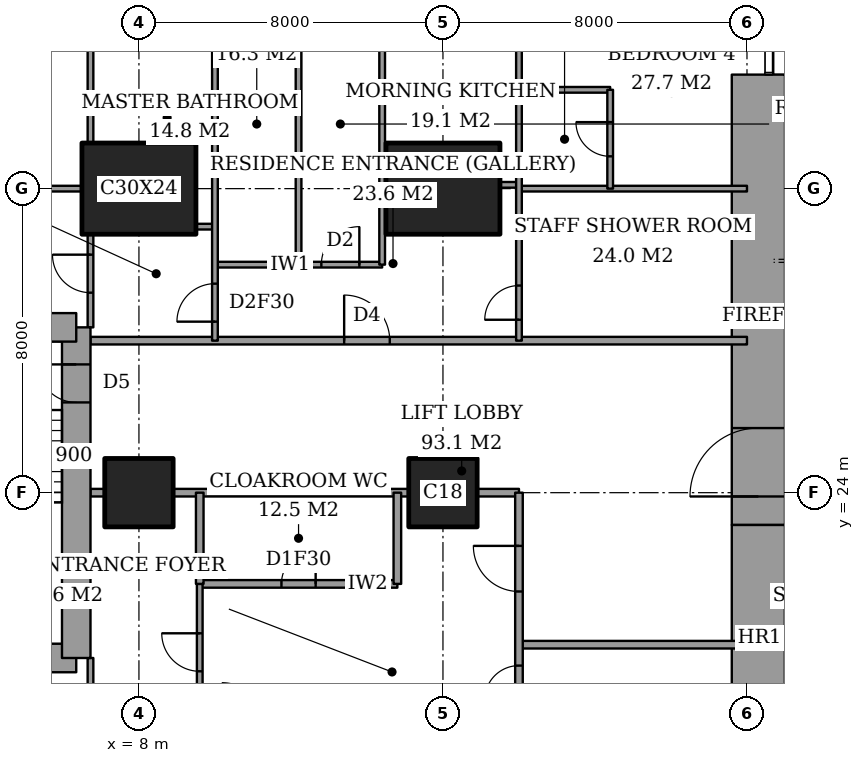
"""IFC4 building model, lengths in metres.
Left out: names, types, materials, properties, quantities, classifications, styles, units other than length and angle.
Written with IfcOpenShell. Run it as: python <this file> out.ifc"""

import sys

from ifc_helpers import new_model, si_unit, direction, frame, frame_2d, origin, origin_2d, place, context, subcontext, project, spatial, rectangle, extrude, element, fill, save


model = new_model("IFC4")
c1 = context("Model", 3, precision=1e-05, world=origin(), true_north=direction((0.0, 1.0)))
c2 = subcontext(c1, "Body", "Model", "MODEL_VIEW")
j1 = project(units=[si_unit("LENGTHUNIT", "METRE"), si_unit("PLANEANGLEUNIT", "RADIAN")], contexts=[c1])
p1 = place(None, origin())
s1 = spatial("IfcSite", under=j1, at=p1, CompositionType="ELEMENT")
p2 = place(p1, origin())
s2 = spatial("IfcBuilding", under=s1, at=p2, CompositionType="ELEMENT")
p3 = place(p2, frame((0.0, 0.0, 185.8)))
s3 = spatial("IfcBuildingStorey", under=s2, at=p3, CompositionType="ELEMENT", Elevation=185.8)
p4 = place(p3, frame((8.0, 24.0, 0.0), z_axis=(0.0, 0.0, 1.0), x_axis=(1.0, 0.0, 0.0)))
e1 = element("IfcColumn", 1, at=p4, inside=s3, PredefinedType="COLUMN", context=c2, shape_type="SweptSolid", body=[
    extrude(rectangle(XDim=1.8, YDim=1.8, at=origin_2d()), origin(), (0.0, 0.0, 1.0), 3.6),
])
p5 = place(p3, frame((8.0, 32.0, 0.0), z_axis=(0.0, 0.0, 1.0), x_axis=(1.0, 0.0, 0.0)))
e2 = element("IfcColumn", 2, at=p5, inside=s3, PredefinedType="COLUMN", context=c2, shape_type="SweptSolid", body=[
    extrude(rectangle(XDim=3.0, YDim=2.4, at=origin_2d()), origin(), (0.0, 0.0, 1.0), 3.6),
])
p6 = place(p3, frame((16.0, 24.0, 0.0), z_axis=(0.0, 0.0, 1.0), x_axis=(1.0, 0.0, 0.0)))
e3 = element("IfcColumn", 3, at=p6, inside=s3, PredefinedType="COLUMN", context=c2, shape_type="SweptSolid", body=[
    extrude(rectangle(XDim=1.8, YDim=1.8, at=origin_2d()), origin(), (0.0, 0.0, 1.0), 3.6),
])
p7 = place(p3, frame((16.0, 32.0, 0.0), z_axis=(0.0, 0.0, 1.0), x_axis=(1.0, 0.0, 0.0)))
e4 = element("IfcColumn", 4, at=p7, inside=s3, PredefinedType="COLUMN", context=c2, shape_type="SweptSolid", body=[
    extrude(rectangle(XDim=3.0, YDim=2.4, at=origin_2d()), origin(), (0.0, 0.0, 1.0), 3.6),
])
p8 = place(p3, frame((24.3, 13.0, 0.0), z_axis=(0.0, 0.0, 1.0), x_axis=(0.0, 1.0, 0.0)))
e5 = element("IfcWall", 5, at=p8, inside=s3, PredefinedType="SHEAR", context=c2, shape_type="SweptSolid", body=[
    extrude(rectangle(XDim=10.15, YDim=1.4, at=frame_2d((5.075, 0.0))), origin(), (0.0, 0.0, 1.0), 3.6),
])
p9 = place(p3, frame((24.3, 23.15, 0.0), z_axis=(0.0, 0.0, 1.0), x_axis=(0.0, 1.0, 0.0)))
e6 = element("IfcWall", 6, at=p9, inside=s3, PredefinedType="SHEAR", context=c2, shape_type="SweptSolid", body=[
    extrude(rectangle(XDim=11.85, YDim=1.4, at=frame_2d((5.925, 0.0))), origin(), (0.0, 0.0, 1.0), 3.6),
])
p10 = place(p9, frame((0.75, 0.0, 0.0)))
e7 = element("IfcOpeningElement", 7, at=p10, cuts=e6, PredefinedType="OPENING", context=c2, shape_type="SweptSolid", body=[
    extrude(rectangle(XDim=1.8, YDim=2.4, at=frame_2d((0.9, 1.2))), frame((0.0, 0.71, 0.0), z_axis=(0.0, -1.0, 0.0), x_axis=(1.0, 0.0, 0.0)), (0.0, 0.0, 1.0), 1.42),
])
p11 = place(p3, frame((1.9, 19.65, 0.0), z_axis=(0.0, 0.0, 1.0), x_axis=(1.0, 0.0, 0.0)))
e8 = element("IfcWall", 8, at=p11, inside=s3, PredefinedType="SHEAR", context=c2, shape_type="SweptSolid", body=[
    extrude(rectangle(XDim=4.45, YDim=0.75, at=frame_2d((2.225, 0.0))), origin(), (0.0, 0.0, 1.0), 3.6),
])
p12 = place(p3, frame((6.35, 19.65, 0.0), z_axis=(0.0, 0.0, 1.0), x_axis=(0.0, 1.0, 0.0)))
e9 = element("IfcWall", 9, at=p12, inside=s3, PredefinedType="SHEAR", context=c2, shape_type="SweptSolid", body=[
    extrude(rectangle(XDim=8.7, YDim=0.75, at=frame_2d((4.35, 0.0))), origin(), (0.0, 0.0, 1.0), 3.6),
])
p13 = place(p12, frame((6.725, 0.0, 0.0)))
e10 = element("IfcOpeningElement", 10, at=p13, cuts=e9, PredefinedType="OPENING", context=c2, shape_type="SweptSolid", body=[
    extrude(rectangle(XDim=1.0, YDim=2.1, at=frame_2d((0.5, 1.05))), frame((0.0, 0.385, 0.0), z_axis=(0.0, -1.0, 0.0), x_axis=(1.0, 0.0, 0.0)), (0.0, 0.0, 1.0), 0.77),
])
p14 = place(p3, frame((6.35, 28.35, 0.0), z_axis=(0.0, 0.0, 1.0), x_axis=(-1.0, 0.0, 0.0)))
e11 = element("IfcWall", 11, at=p14, inside=s3, PredefinedType="SHEAR", context=c2, shape_type="SweptSolid", body=[
    extrude(rectangle(XDim=4.45, YDim=0.75, at=frame_2d((2.225, 0.0))), origin(), (0.0, 0.0, 1.0), 3.6),
])
p15 = place(p3, frame((18.0, 20.0, 0.0), z_axis=(0.0, 0.0, 1.0), x_axis=(1.0, 0.0, 0.0)))
e12 = element("IfcWall", 12, at=p15, inside=s3, PredefinedType="PARTITIONING", context=c2, shape_type="SweptSolid", body=[
    extrude(rectangle(XDim=6.0, YDim=0.2, at=frame_2d((3.0, 0.0))), origin(), (0.0, 0.0, 1.0), 3.35),
])
p16 = place(p3, frame((9.6, 21.6, 0.0), z_axis=(0.0, 0.0, 1.0), x_axis=(1.0, 0.0, 0.0)))
e13 = element("IfcWall", 13, at=p16, inside=s3, PredefinedType="PARTITIONING", context=c2, shape_type="SweptSolid", body=[
    extrude(rectangle(XDim=5.2, YDim=0.2, at=frame_2d((2.6, 0.0))), origin(), (0.0, 0.0, 1.0), 3.35),
])
p17 = place(p16, frame((2.15, 0.0, 0.0)))
e14 = element("IfcOpeningElement", 14, at=p17, cuts=e13, PredefinedType="OPENING", context=c2, shape_type="SweptSolid", body=[
    extrude(rectangle(XDim=0.9, YDim=2.1, at=frame_2d((0.45, 1.05))), frame((0.0, 0.11, 0.0), z_axis=(0.0, -1.0, 0.0), x_axis=(1.0, 0.0, 0.0)), (0.0, 0.0, 1.0), 0.22),
])
p18 = place(p3, frame((6.725, 24.0, 0.0), z_axis=(0.0, 0.0, 1.0), x_axis=(1.0, 0.0, 0.0)))
e15 = element("IfcWall", 15, at=p18, inside=s3, PredefinedType="PARTITIONING", context=c2, shape_type="SweptSolid", body=[
    extrude(rectangle(XDim=0.375, YDim=0.2, at=frame_2d((0.188, 0.0))), origin(), (0.0, 0.0, 1.0), 3.35),
])
p19 = place(p3, frame((8.9, 24.0, 0.0), z_axis=(0.0, 0.0, 1.0), x_axis=(1.0, 0.0, 0.0)))
e16 = element("IfcWall", 16, at=p19, inside=s3, PredefinedType="PARTITIONING", context=c2, shape_type="SweptSolid", body=[
    extrude(rectangle(XDim=6.2, YDim=0.2, at=frame_2d((3.1, 0.0))), origin(), (0.0, 0.0, 1.0), 3.35),
])
p20 = place(p3, frame((16.9, 24.0, 0.0), z_axis=(0.0, 0.0, 1.0), x_axis=(1.0, 0.0, 0.0)))
e17 = element("IfcWall", 17, at=p20, inside=s3, PredefinedType="PARTITIONING", context=c2, shape_type="SweptSolid", body=[
    extrude(rectangle(XDim=1.1, YDim=0.2, at=frame_2d((0.55, 0.0))), origin(), (0.0, 0.0, 1.0), 3.35),
])
p21 = place(p3, frame((6.725, 28.0, 0.0), z_axis=(0.0, 0.0, 1.0), x_axis=(1.0, 0.0, 0.0)))
e18 = element("IfcWall", 18, at=p21, inside=s3, PredefinedType="PARTITIONING", context=c2, shape_type="SweptSolid", body=[
    extrude(rectangle(XDim=17.275, YDim=0.2, at=frame_2d((8.637, 0.0))), origin(), (0.0, 0.0, 1.0), 3.35),
])
p22 = place(p21, frame((6.675, 0.0, 0.0)))
e19 = element("IfcOpeningElement", 19, at=p22, cuts=e18, PredefinedType="OPENING", context=c2, shape_type="SweptSolid", body=[
    extrude(rectangle(XDim=1.2, YDim=2.4, at=frame_2d((0.6, 1.2))), frame((0.0, 0.11, 0.0), z_axis=(0.0, -1.0, 0.0), x_axis=(1.0, 0.0, 0.0)), (0.0, 0.0, 1.0), 0.22),
])
p23 = place(p3, frame((10.0, 30.0, 0.0), z_axis=(0.0, 0.0, 1.0), x_axis=(1.0, 0.0, 0.0)))
e20 = element("IfcWall", 20, at=p23, inside=s3, PredefinedType="PARTITIONING", context=c2, shape_type="SweptSolid", body=[
    extrude(rectangle(XDim=4.4, YDim=0.15, at=frame_2d((2.2, 0.0))), origin(), (0.0, 0.0, 1.0), 3.35),
])
p24 = place(p23, frame((2.8, 0.0, 0.0)))
e21 = element("IfcOpeningElement", 21, at=p24, cuts=e20, PredefinedType="OPENING", context=c2, shape_type="SweptSolid", body=[
    extrude(rectangle(XDim=1.0, YDim=2.1, at=frame_2d((0.5, 1.05))), frame((0.0, 0.085, 0.0), z_axis=(0.0, -1.0, 0.0), x_axis=(1.0, 0.0, 0.0)), (0.0, 0.0, 1.0), 0.17),
])
p25 = place(p3, frame((9.5, 31.0, 0.0), z_axis=(0.0, 0.0, 1.0), x_axis=(1.0, 0.0, 0.0)))
e22 = element("IfcWall", 22, at=p25, inside=s3, PredefinedType="PARTITIONING", context=c2, shape_type="SweptSolid", body=[
    extrude(rectangle(XDim=0.5, YDim=0.15, at=frame_2d((0.25, 0.0))), origin(), (0.0, 0.0, 1.0), 3.35),
])
p26 = place(p3, frame((1.25, 32.0, 0.0), z_axis=(0.0, 0.0, 1.0), x_axis=(1.0, 0.0, 0.0)))
e23 = element("IfcWall", 23, at=p26, inside=s3, PredefinedType="PARTITIONING", context=c2, shape_type="SweptSolid", body=[
    extrude(rectangle(XDim=5.25, YDim=0.15, at=frame_2d((2.625, 0.0))), origin(), (0.0, 0.0, 1.0), 2.634),
])
p27 = place(p3, frame((18.0, 32.0, 0.0), z_axis=(0.0, 0.0, 1.0), x_axis=(1.0, 0.0, 0.0)))
e24 = element("IfcWall", 24, at=p27, inside=s3, PredefinedType="PARTITIONING", context=c2, shape_type="SweptSolid", body=[
    extrude(rectangle(XDim=6.0, YDim=0.15, at=frame_2d((3.0, 0.0))), origin(), (0.0, 0.0, 1.0), 2.634),
])
p28 = place(p3, frame((17.5, 32.1, 0.0), z_axis=(0.0, 0.0, 1.0), x_axis=(1.0, 0.0, 0.0)))
e25 = element("IfcWall", 25, at=p28, inside=s3, PredefinedType="PARTITIONING", context=c2, shape_type="SweptSolid", body=[
    extrude(rectangle(XDim=0.5, YDim=0.15, at=frame_2d((0.25, 0.0))), origin(), (0.0, 0.0, 1.0), 2.634),
])
p29 = place(p3, frame((18.0, 34.6, 0.0), z_axis=(0.0, 0.0, 1.0), x_axis=(1.0, 0.0, 0.0)))
e26 = element("IfcWall", 26, at=p29, inside=s3, PredefinedType="PARTITIONING", context=c2, shape_type="SweptSolid", body=[
    extrude(rectangle(XDim=2.4, YDim=0.15, at=frame_2d((1.2, 0.0))), origin(), (0.0, 0.0, 1.0), 3.35),
])
p30 = place(p3, frame((6.725, 17.2, 0.0), z_axis=(0.0, 0.0, 1.0), x_axis=(0.0, 1.0, 0.0)))
e27 = element("IfcWall", 27, at=p30, inside=s3, PredefinedType="PARTITIONING", context=c2, shape_type="SweptSolid", body=[
    extrude(rectangle(XDim=2.45, YDim=0.15, at=frame_2d((1.225, 0.0))), origin(), (0.0, 0.0, 1.0), 3.35),
])
p31 = place(p30, frame((0.587, 0.0, 0.0)))
e28 = element("IfcOpeningElement", 28, at=p31, cuts=e27, PredefinedType="OPENING", context=c2, shape_type="SweptSolid", body=[
    extrude(rectangle(XDim=0.9, YDim=2.1, at=frame_2d((0.45, 1.05))), frame((0.0, 0.085, 0.0), z_axis=(0.0, -1.0, 0.0), x_axis=(1.0, 0.0, 0.0)), (0.0, 0.0, 1.0), 0.17),
])
p32 = place(p3, frame((6.725, 28.35, 0.0), z_axis=(0.0, 0.0, 1.0), x_axis=(0.0, 1.0, 0.0)))
e29 = element("IfcWall", 29, at=p32, inside=s3, PredefinedType="PARTITIONING", context=c2, shape_type="SweptSolid", body=[
    extrude(rectangle(XDim=2.45, YDim=0.15, at=frame_2d((1.225, 0.0))), origin(), (0.0, 0.0, 1.0), 3.35),
])
p33 = place(p32, frame((0.913, 0.0, 0.0)))
e30 = element("IfcOpeningElement", 30, at=p33, cuts=e29, PredefinedType="OPENING", context=c2, shape_type="SweptSolid", body=[
    extrude(rectangle(XDim=1.0, YDim=2.1, at=frame_2d((0.5, 1.05))), frame((0.0, 0.085, 0.0), z_axis=(0.0, -1.0, 0.0), x_axis=(1.0, 0.0, 0.0)), (0.0, 0.0, 1.0), 0.17),
])
p34 = place(p3, frame((6.725, 33.2, 0.0), z_axis=(0.0, 0.0, 1.0), x_axis=(0.0, 1.0, 0.0)))
e31 = element("IfcWall", 31, at=p34, inside=s3, PredefinedType="PARTITIONING", context=c2, shape_type="SweptSolid", body=[
    extrude(rectangle(XDim=4.2, YDim=0.15, at=frame_2d((2.1, 0.0))), origin(), (0.0, 0.0, 1.0), 3.35),
])
p35 = place(p3, frame((9.6, 21.6, 0.0), z_axis=(0.0, 0.0, 1.0), x_axis=(0.0, 1.0, 0.0)))
e32 = element("IfcWall", 32, at=p35, inside=s3, PredefinedType="PARTITIONING", context=c2, shape_type="SweptSolid", body=[
    extrude(rectangle(XDim=2.4, YDim=0.2, at=frame_2d((1.2, 0.0))), origin(), (0.0, 0.0, 1.0), 3.35),
])
p36 = place(p3, frame((9.6, 10.6, 0.0), z_axis=(0.0, 0.0, 1.0), x_axis=(0.0, 1.0, 0.0)))
e33 = element("IfcWall", 33, at=p36, inside=s3, PredefinedType="PARTITIONING", context=c2, shape_type="SweptSolid", body=[
    extrude(rectangle(XDim=11.0, YDim=0.15, at=frame_2d((5.5, 0.0))), origin(), (0.0, 0.0, 1.0), 3.35),
])
p37 = place(p36, frame((8.7, 0.0, 0.0)))
e34 = element("IfcOpeningElement", 34, at=p37, cuts=e33, PredefinedType="OPENING", context=c2, shape_type="SweptSolid", body=[
    extrude(rectangle(XDim=1.0, YDim=2.1, at=frame_2d((0.5, 1.05))), frame((0.0, 0.085, 0.0), z_axis=(0.0, -1.0, 0.0), x_axis=(1.0, 0.0, 0.0)), (0.0, 0.0, 1.0), 0.17),
])
p38 = place(p3, frame((10.0, 28.0, 0.0), z_axis=(0.0, 0.0, 1.0), x_axis=(0.0, 1.0, 0.0)))
e35 = element("IfcWall", 35, at=p38, inside=s3, PredefinedType="PARTITIONING", context=c2, shape_type="SweptSolid", body=[
    extrude(rectangle(XDim=9.4, YDim=0.15, at=frame_2d((4.7, 0.0))), origin(), (0.0, 0.0, 1.0), 3.35),
])
p39 = place(p38, frame((0.5, 0.0, 0.0)))
e36 = element("IfcOpeningElement", 36, at=p39, cuts=e35, PredefinedType="OPENING", context=c2, shape_type="SweptSolid", body=[
    extrude(rectangle(XDim=1.0, YDim=2.1, at=frame_2d((0.5, 1.05))), frame((0.0, 0.085, 0.0), z_axis=(0.0, -1.0, 0.0), x_axis=(1.0, 0.0, 0.0)), (0.0, 0.0, 1.0), 0.17),
])
for number, where, z_axis, x_axis in (
    (37, (12.2, 30.0, 0.0), (0.0, 0.0, 1.0), (0.0, 1.0, 0.0)),
    (38, (14.4, 30.0, 0.0), (0.0, 0.0, 1.0), (0.0, 1.0, 0.0)),
):
    element("IfcWall", number, at=place(p3, frame(where, z_axis=z_axis, x_axis=x_axis)), inside=s3, PredefinedType="PARTITIONING", context=c2, shape_type="SweptSolid", body=[
        extrude(rectangle(XDim=7.4, YDim=0.15, at=frame_2d((3.7, 0.0))), origin(), (0.0, 0.0, 1.0), 3.35),
    ])
p40 = place(p3, frame((14.8, 21.6, 0.0), z_axis=(0.0, 0.0, 1.0), x_axis=(0.0, 1.0, 0.0)))
e39 = element("IfcWall", 39, at=p40, inside=s3, PredefinedType="PARTITIONING", context=c2, shape_type="SweptSolid", body=[
    extrude(rectangle(XDim=2.4, YDim=0.2, at=frame_2d((1.2, 0.0))), origin(), (0.0, 0.0, 1.0), 3.35),
])
p41 = place(p3, frame((18.0, 18.0, 0.0), z_axis=(0.0, 0.0, 1.0), x_axis=(0.0, 1.0, 0.0)))
e40 = element("IfcWall", 40, at=p41, inside=s3, PredefinedType="PARTITIONING", context=c2, shape_type="SweptSolid", body=[
    extrude(rectangle(XDim=6.0, YDim=0.2, at=frame_2d((3.0, 0.0))), origin(), (0.0, 0.0, 1.0), 3.35),
])
p42 = place(p41, frame((3.4, 0.0, 0.0)))
e41 = element("IfcOpeningElement", 41, at=p42, cuts=e40, PredefinedType="OPENING", context=c2, shape_type="SweptSolid", body=[
    extrude(rectangle(XDim=1.2, YDim=2.4, at=frame_2d((0.6, 1.2))), frame((0.0, 0.11, 0.0), z_axis=(0.0, -1.0, 0.0), x_axis=(1.0, 0.0, 0.0)), (0.0, 0.0, 1.0), 0.22),
])
p43 = place(p41, frame((0.55, 0.0, 0.0)))
e42 = element("IfcOpeningElement", 42, at=p43, cuts=e40, PredefinedType="OPENING", context=c2, shape_type="SweptSolid", body=[
    extrude(rectangle(XDim=0.9, YDim=2.1, at=frame_2d((0.45, 1.05))), frame((0.0, 0.11, 0.0), z_axis=(0.0, -1.0, 0.0), x_axis=(1.0, 0.0, 0.0)), (0.0, 0.0, 1.0), 0.22),
])
p44 = place(p3, frame((18.0, 28.0, 0.0), z_axis=(0.0, 0.0, 1.0), x_axis=(0.0, 1.0, 0.0)))
e43 = element("IfcWall", 43, at=p44, inside=s3, PredefinedType="PARTITIONING", context=c2, shape_type="SweptSolid", body=[
    extrude(rectangle(XDim=9.4, YDim=0.15, at=frame_2d((4.7, 0.0))), origin(), (0.0, 0.0, 1.0), 3.35),
])
p45 = place(p44, frame((0.55, 0.0, 0.0)))
e44 = element("IfcOpeningElement", 44, at=p45, cuts=e43, PredefinedType="OPENING", context=c2, shape_type="SweptSolid", body=[
    extrude(rectangle(XDim=0.9, YDim=2.1, at=frame_2d((0.45, 1.05))), frame((0.0, 0.085, 0.0), z_axis=(0.0, -1.0, 0.0), x_axis=(1.0, 0.0, 0.0)), (0.0, 0.0, 1.0), 0.17),
])
p46 = place(p3, frame((20.4, 32.0, 0.0), z_axis=(0.0, 0.0, 1.0), x_axis=(0.0, 1.0, 0.0)))
e45 = element("IfcWall", 45, at=p46, inside=s3, PredefinedType="PARTITIONING", context=c2, shape_type="SweptSolid", body=[
    extrude(rectangle(XDim=2.6, YDim=0.15, at=frame_2d((1.3, 0.0))), origin(), (0.0, 0.0, 1.0), 3.35),
])
p47 = place(p46, frame((0.85, 0.0, 0.0)))
e46 = element("IfcOpeningElement", 46, at=p47, cuts=e45, PredefinedType="OPENING", context=c2, shape_type="SweptSolid", body=[
    extrude(rectangle(XDim=0.9, YDim=2.1, at=frame_2d((0.45, 1.05))), frame((0.0, 0.085, 0.0), z_axis=(0.0, -1.0, 0.0), x_axis=(1.0, 0.0, 0.0)), (0.0, 0.0, 1.0), 0.17),
])
p48 = place(p37, origin())
e47 = element("IfcDoor", 47, at=p48, inside=s3, OperationType="SINGLE_SWING_LEFT", PredefinedType="DOOR", context=c2, shape_type="SweptSolid", body=[
    extrude(rectangle(XDim=1.0, YDim=2.1, at=frame_2d((0.5, 1.05))), frame((0.0, 0.025, 0.0), z_axis=(0.0, -1.0, 0.0), x_axis=(1.0, 0.0, 0.0)), (0.0, 0.0, 1.0), 0.05),
])
fill(e34, e47)
p49 = place(p17, origin())
e48 = element("IfcDoor", 48, at=p49, inside=s3, OperationType="SINGLE_SWING_LEFT", PredefinedType="DOOR", context=c2, shape_type="SweptSolid", body=[
    extrude(rectangle(XDim=0.9, YDim=2.1, at=frame_2d((0.45, 1.05))), frame((0.0, 0.025, 0.0), z_axis=(0.0, -1.0, 0.0), x_axis=(1.0, 0.0, 0.0)), (0.0, 0.0, 1.0), 0.05),
])
fill(e14, e48)
p50 = place(p42, origin())
e49 = element("IfcDoor", 49, at=p50, inside=s3, OperationType="SINGLE_SWING_LEFT", PredefinedType="DOOR", context=c2, shape_type="SweptSolid", body=[
    extrude(rectangle(XDim=1.2, YDim=2.4, at=frame_2d((0.6, 1.2))), frame((0.0, 0.025, 0.0), z_axis=(0.0, -1.0, 0.0), x_axis=(1.0, 0.0, 0.0)), (0.0, 0.0, 1.0), 0.05),
])
fill(e41, e49)
p51 = place(p43, origin())
e50 = element("IfcDoor", 50, at=p51, inside=s3, OperationType="SINGLE_SWING_RIGHT", PredefinedType="DOOR", context=c2, shape_type="SweptSolid", body=[
    extrude(rectangle(XDim=0.9, YDim=2.1, at=frame_2d((0.45, 1.05))), frame((0.0, 0.025, 0.0), z_axis=(0.0, -1.0, 0.0), x_axis=(1.0, 0.0, 0.0)), (0.0, 0.0, 1.0), 0.05),
])
fill(e42, e50)
p52 = place(p33, origin())
e51 = element("IfcDoor", 51, at=p52, inside=s3, OperationType="SINGLE_SWING_LEFT", PredefinedType="DOOR", context=c2, shape_type="SweptSolid", body=[
    extrude(rectangle(XDim=1.0, YDim=2.1, at=frame_2d((0.5, 1.05))), frame((0.0, 0.025, 0.0), z_axis=(0.0, -1.0, 0.0), x_axis=(1.0, 0.0, 0.0)), (0.0, 0.0, 1.0), 0.05),
])
fill(e30, e51)
p53 = place(p39, origin())
e52 = element("IfcDoor", 52, at=p53, inside=s3, OperationType="SINGLE_SWING_RIGHT", PredefinedType="DOOR", context=c2, shape_type="SweptSolid", body=[
    extrude(rectangle(XDim=1.0, YDim=2.1, at=frame_2d((0.5, 1.05))), frame((0.0, 0.025, 0.0), z_axis=(0.0, -1.0, 0.0), x_axis=(1.0, 0.0, 0.0)), (0.0, 0.0, 1.0), 0.05),
])
fill(e36, e52)
p54 = place(p22, origin())
e53 = element("IfcDoor", 53, at=p54, inside=s3, OperationType="SINGLE_SWING_RIGHT", PredefinedType="DOOR", context=c2, shape_type="SweptSolid", body=[
    extrude(rectangle(XDim=1.2, YDim=2.4, at=frame_2d((0.6, 1.2))), frame((0.0, 0.025, 0.0), z_axis=(0.0, -1.0, 0.0), x_axis=(1.0, 0.0, 0.0)), (0.0, 0.0, 1.0), 0.05),
])
fill(e19, e53)
p55 = place(p24, origin())
e54 = element("IfcDoor", 54, at=p55, inside=s3, OperationType="SINGLE_SWING_LEFT", PredefinedType="DOOR", context=c2, shape_type="SweptSolid", body=[
    extrude(rectangle(XDim=1.0, YDim=2.1, at=frame_2d((0.5, 1.05))), frame((0.0, 0.025, 0.0), z_axis=(0.0, -1.0, 0.0), x_axis=(1.0, 0.0, 0.0)), (0.0, 0.0, 1.0), 0.05),
])
fill(e21, e54)
p56 = place(p47, origin())
e55 = element("IfcDoor", 55, at=p56, inside=s3, OperationType="SINGLE_SWING_LEFT", PredefinedType="DOOR", context=c2, shape_type="SweptSolid", body=[
    extrude(rectangle(XDim=0.9, YDim=2.1, at=frame_2d((0.45, 1.05))), frame((0.0, 0.025, 0.0), z_axis=(0.0, -1.0, 0.0), x_axis=(1.0, 0.0, 0.0)), (0.0, 0.0, 1.0), 0.05),
])
fill(e46, e55)
p57 = place(p45, origin())
e56 = element("IfcDoor", 56, at=p57, inside=s3, OperationType="SINGLE_SWING_RIGHT", PredefinedType="DOOR", context=c2, shape_type="SweptSolid", body=[
    extrude(rectangle(XDim=0.9, YDim=2.1, at=frame_2d((0.45, 1.05))), frame((0.0, 0.025, 0.0), z_axis=(0.0, -1.0, 0.0), x_axis=(1.0, 0.0, 0.0)), (0.0, 0.0, 1.0), 0.05),
])
fill(e44, e56)
p58 = place(p10, origin())
e57 = element("IfcDoor", 57, at=p58, inside=s3, OperationType="DOUBLE_DOOR_DOUBLE_SWING", PredefinedType="DOOR", context=c2, shape_type="SweptSolid", body=[
    extrude(rectangle(XDim=1.8, YDim=2.4, at=frame_2d((0.9, 1.2))), frame((0.0, 0.025, 0.0), z_axis=(0.0, -1.0, 0.0), x_axis=(1.0, 0.0, 0.0)), (0.0, 0.0, 1.0), 0.05),
])
fill(e7, e57)
p59 = place(p13, origin())
e58 = element("IfcDoor", 58, at=p59, inside=s3, OperationType="SINGLE_SWING_LEFT", PredefinedType="DOOR", context=c2, shape_type="SweptSolid", body=[
    extrude(rectangle(XDim=1.0, YDim=2.1, at=frame_2d((0.5, 1.05))), frame((0.0, 0.025, 0.0), z_axis=(0.0, -1.0, 0.0), x_axis=(1.0, 0.0, 0.0)), (0.0, 0.0, 1.0), 0.05),
])
fill(e10, e58)
save(model, sys.argv[1])
